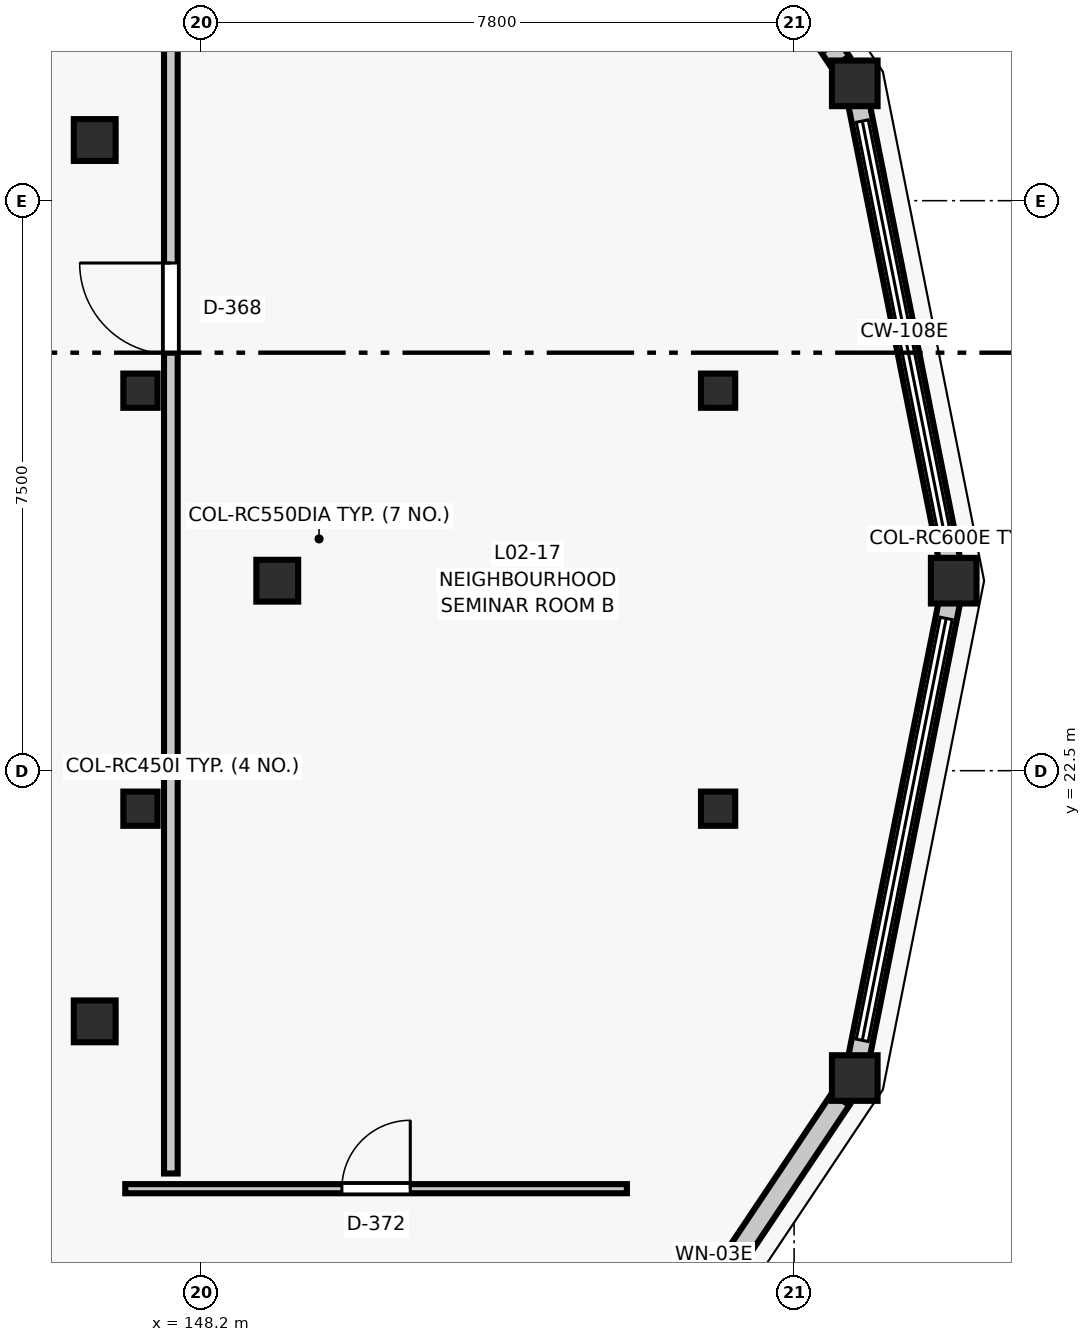
"""IFC4 building model, lengths in metres.
Left out: names, types, materials, properties, quantities, classifications, styles, units other than length and angle.
Written with IfcOpenShell. Run it as: python <this file> out.ifc"""

import sys

from ifc_helpers import new_model, si_unit, direction, frame, frame_2d, origin, origin_2d, place, context, subcontext, project, spatial, rectangle, circle, extrude, element, fill, save


model = new_model("IFC4")
c1 = context("Model", 3, precision=1e-05, world=origin(), true_north=direction((0.0, 1.0)))
c2 = subcontext(c1, "Body", "Model", "MODEL_VIEW")
j1 = project(units=[si_unit("LENGTHUNIT", "METRE"), si_unit("PLANEANGLEUNIT", "RADIAN")], contexts=[c1])
p1 = place(None, origin())
s1 = spatial("IfcSite", under=j1, at=p1, CompositionType="ELEMENT")
p2 = place(p1, origin())
s2 = spatial("IfcBuilding", under=s1, at=p2, CompositionType="ELEMENT")
p3 = place(p2, frame((0.0, 0.0, 8.7)))
s3 = spatial("IfcBuildingStorey", under=s2, at=p3, CompositionType="ELEMENT", Elevation=8.7)
for number, where, z_axis, x_axis in (
    (1, (147.4, 22.0, 0.0), (0.0, 0.0, 1.0), (1.0, 0.0, 0.0)),
    (2, (155.0, 22.0, 0.0), (0.0, 0.0, 1.0), (1.0, 0.0, 0.0)),
    (3, (155.0, 27.5, 0.0), (0.0, 0.0, 1.0), (1.0, 0.0, 0.0)),
    (4, (147.4, 27.5, 0.0), (0.0, 0.0, 1.0), (1.0, 0.0, 0.0)),
):
    element("IfcColumn", number, at=place(p3, frame(where, z_axis=z_axis, x_axis=x_axis)), inside=s3, PredefinedType="COLUMN", context=c2, shape_type="SweptSolid", body=[
        extrude(rectangle(XDim=0.45, YDim=0.45, at=origin_2d()), origin(), (0.0, 0.0, 1.0), 3.9),
    ])
for number, where, z_axis, x_axis in (
    (5, (149.2, 25.0, 0.0), (0.0, 0.0, 1.0), (1.0, 0.0, 0.0)),
    (6, (146.798, 30.798, 0.0), (0.0, 0.0, 1.0), (1.0, 0.0, 0.0)),
    (7, (146.798, 19.202, 0.0), (0.0, 0.0, 1.0), (1.0, 0.0, 0.0)),
):
    element("IfcColumn", number, at=place(p3, frame(where, z_axis=z_axis, x_axis=x_axis)), inside=s3, PredefinedType="COLUMN", context=c2, shape_type="SweptSolid", body=[
        extrude(circle(Radius=0.275, at=origin_2d()), origin(), (0.0, 0.0, 1.0), 3.9),
    ])
for number, where, z_axis, x_axis in (
    (8, (158.1, 25.0, 0.0), (0.0, 0.0, 1.0), (1.0, 0.0, 0.0)),
    (9, (156.798, 31.544, 0.0), (0.0, 0.0, 1.0), (1.0, 0.0, 0.0)),
    (10, (156.798, 18.456, 0.0), (0.0, 0.0, 1.0), (1.0, 0.0, 0.0)),
):
    element("IfcColumn", number, at=place(p3, frame(where, z_axis=z_axis, x_axis=x_axis)), inside=s3, PredefinedType="COLUMN", context=c2, shape_type="SweptSolid", body=[
        extrude(rectangle(XDim=0.6, YDim=0.6, at=origin_2d()), origin(), (0.0, 0.0, 1.0), 3.9),
    ])
p4 = place(p3, frame((156.853, 31.268, 0.0), z_axis=(0.0, 0.0, 1.0), x_axis=(0.195101780047, -0.98078300119, 0.0)))
e11 = element("IfcWall", 11, at=p4, inside=s3, PredefinedType="STANDARD", context=c2, shape_type="SweptSolid", body=[
    extrude(rectangle(XDim=6.11, YDim=0.28, at=frame_2d((3.055, 0.0))), origin(), (0.0, 0.0, 1.0), 0.8),
])
p5 = place(p3, frame((153.278, 36.812, 0.0), z_axis=(0.0, 0.0, 1.0), x_axis=(0.555573083966, -0.831467707354, 0.0)))
e12 = element("IfcWall", 12, at=p5, inside=s3, PredefinedType="STANDARD", context=c2, shape_type="SweptSolid", body=[
    extrude(rectangle(XDim=6.0, YDim=0.28, at=frame_2d((3.0, 0.0))), origin(), (0.0, 0.0, 1.0), 0.8),
])
p6 = place(p3, frame((156.612, 18.177, 0.0), z_axis=(0.0, 0.0, 1.0), x_axis=(-0.555573083966, -0.831467707354, 0.0)))
e13 = element("IfcWall", 13, at=p6, inside=s3, PredefinedType="STANDARD", context=c2, shape_type="SweptSolid", body=[
    extrude(rectangle(XDim=6.0, YDim=0.28, at=frame_2d((3.0, 0.0))), origin(), (0.0, 0.0, 1.0), 2.835),
])
p7 = place(p6, frame((2.4, 0.0, 0.85)))
e14 = element("IfcOpeningElement", 14, at=p7, cuts=e13, PredefinedType="OPENING", context=c2, shape_type="SweptSolid", body=[
    extrude(rectangle(XDim=1.2, YDim=1.2, at=frame_2d((0.6, 0.6))), frame((0.0, 0.15, 0.0), z_axis=(0.0, -1.0, 0.0), x_axis=(1.0, 0.0, 0.0)), (0.0, 0.0, 1.0), 0.3),
])
p8 = place(p3, frame((158.045, 24.725, 0.0), z_axis=(0.0, 0.0, 1.0), x_axis=(-0.195101780047, -0.98078300119, 0.0)))
e15 = element("IfcWall", 15, at=p8, inside=s3, PredefinedType="STANDARD", context=c2, shape_type="SweptSolid", body=[
    extrude(rectangle(XDim=6.11, YDim=0.28, at=frame_2d((3.055, 0.0))), origin(), (0.0, 0.0, 1.0), 0.8),
])
p9 = place(p3, frame((147.8, 17.2, 0.0), z_axis=(0.0, 0.0, 1.0), x_axis=(0.0, 1.0, 0.0)))
e16 = element("IfcWall", 16, at=p9, inside=s3, PredefinedType="PARTITIONING", context=c2, shape_type="SweptSolid", body=[
    extrude(rectangle(XDim=16.6, YDim=0.18, at=frame_2d((8.3, 0.0))), origin(), (0.0, 0.0, 1.0), 3.595),
])
p10 = place(p9, frame((10.78, 0.0, 0.0)))
e17 = element("IfcOpeningElement", 17, at=p10, cuts=e16, PredefinedType="OPENING", context=c2, shape_type="SweptSolid", body=[
    extrude(rectangle(XDim=1.2, YDim=2.15, at=frame_2d((0.6, 1.075))), frame((0.0, 0.1, 0.0), z_axis=(0.0, -1.0, 0.0), x_axis=(1.0, 0.0, 0.0)), (0.0, 0.0, 1.0), 0.2),
])
p11 = place(p3, frame((147.2, 17.0, 0.0), z_axis=(0.0, 0.0, 1.0), x_axis=(1.0, 0.0, 0.0)))
e18 = element("IfcWall", 18, at=p11, inside=s3, PredefinedType="PARTITIONING", context=c2, shape_type="SweptSolid", body=[
    extrude(rectangle(XDim=6.6, YDim=0.12, at=frame_2d((3.3, 0.0))), origin(), (0.0, 0.0, 1.0), 3.595),
])
p12 = place(p11, frame((2.85, 0.0, 0.0)))
e19 = element("IfcOpeningElement", 19, at=p12, cuts=e18, PredefinedType="OPENING", context=c2, shape_type="SweptSolid", body=[
    extrude(rectangle(XDim=0.9, YDim=2.1, at=frame_2d((0.45, 1.05))), frame((0.0, 0.07, 0.0), z_axis=(0.0, -1.0, 0.0), x_axis=(1.0, 0.0, 0.0)), (0.0, 0.0, 1.0), 0.14),
])
p13 = place(p7, origin())
e20 = element("IfcWindow", 20, at=p13, inside=s3, PartitioningType="SINGLE_PANEL", PredefinedType="WINDOW", context=c2, shape_type="SweptSolid", body=[
    extrude(rectangle(XDim=1.2, YDim=1.2, at=frame_2d((0.6, 0.6))), frame((0.0, 0.03, 0.0), z_axis=(0.0, -1.0, 0.0), x_axis=(1.0, 0.0, 0.0)), (0.0, 0.0, 1.0), 0.06),
])
fill(e14, e20)
p14 = place(p10, origin())
e21 = element("IfcDoor", 21, at=p14, inside=s3, OperationType="SINGLE_SWING_RIGHT", PredefinedType="DOOR", context=c2, shape_type="SweptSolid", body=[
    extrude(rectangle(XDim=1.2, YDim=2.15, at=frame_2d((0.6, 1.075))), frame((0.0, 0.025, 0.0), z_axis=(0.0, -1.0, 0.0), x_axis=(1.0, 0.0, 0.0)), (0.0, 0.0, 1.0), 0.05),
])
fill(e17, e21)
p15 = place(p12, origin())
e22 = element("IfcDoor", 22, at=p15, inside=s3, OperationType="SINGLE_SWING_RIGHT", PredefinedType="DOOR", context=c2, shape_type="SweptSolid", body=[
    extrude(rectangle(XDim=0.9, YDim=2.1, at=frame_2d((0.45, 1.05))), frame((0.0, 0.025, 0.0), z_axis=(0.0, -1.0, 0.0), x_axis=(1.0, 0.0, 0.0)), (0.0, 0.0, 1.0), 0.05),
])
fill(e19, e22)
save(model, sys.argv[1])
